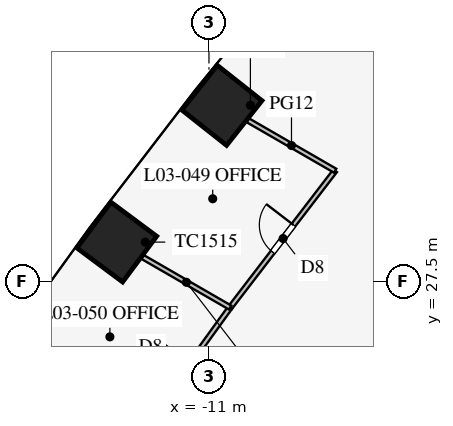
"""IFC4 building model, lengths in metres.
Left out: names, types, materials, properties, quantities, classifications, styles, units other than length and angle.
Written with IfcOpenShell. Run it as: python <this file> out.ifc"""

import sys

from ifc_helpers import new_model, si_unit, direction, frame, frame_2d, origin, origin_2d, place, context, subcontext, project, spatial, rectangle, extrude, element, fill, save


model = new_model("IFC4")
c1 = context("Model", 3, precision=1e-05, world=origin(), true_north=direction((0.0, 1.0)))
c2 = subcontext(c1, "Body", "Model", "MODEL_VIEW")
j1 = project(units=[si_unit("LENGTHUNIT", "METRE"), si_unit("PLANEANGLEUNIT", "RADIAN")], contexts=[c1])
p1 = place(None, origin())
s1 = spatial("IfcSite", under=j1, at=p1, CompositionType="ELEMENT")
p2 = place(p1, origin())
s2 = spatial("IfcBuilding", under=s1, at=p2, CompositionType="ELEMENT")
p3 = place(p2, frame((0.0, 0.0, 16.5)))
s3 = spatial("IfcBuildingStorey", under=s2, at=p3, CompositionType="ELEMENT", Elevation=16.5)
for number, where, z_axis, x_axis in (
    (1, (-10.66, 32.135, 0.0), (0.0, 0.0, 1.0), (-0.62, -0.784, 0.0)),
    (2, (-13.426, 28.536, 0.0), (0.0, 0.0, 1.0), (-0.597, -0.802, 0.0)),
    (3, (-16.076, 24.87, 0.0), (0.0, 0.0, 1.0), (-0.574, -0.819, 0.0)),
):
    element("IfcColumn", number, at=place(p3, frame(where, z_axis=z_axis, x_axis=x_axis)), inside=s3, PredefinedType="COLUMN", context=c2, shape_type="SweptSolid", body=[
        extrude(rectangle(XDim=1.5, YDim=1.5, at=origin_2d()), origin(), (0.0, 0.0, 1.0), 4.2),
    ])
p4 = place(p3, frame((-10.443, 26.814, 0.0), z_axis=(0.0, 0.0, 1.0), x_axis=(-0.58534077607, -0.810787380187, 0.0)))
e4 = element("IfcWall", 4, at=p4, inside=s3, PredefinedType="PARTITIONING", context=c2, shape_type="SweptSolid", body=[
    extrude(rectangle(XDim=4.523, YDim=0.12, at=frame_2d((2.262, 0.0))), origin(), (0.0, 0.0, 1.0), 2.9),
])
p5 = place(p4, frame((1.8, 0.0, 0.15)))
e5 = element("IfcOpeningElement", 5, at=p5, cuts=e4, PredefinedType="OPENING", context=c2, shape_type="SweptSolid", body=[
    extrude(rectangle(XDim=0.9, YDim=2.1, at=frame_2d((0.45, 1.05))), frame((0.0, 0.07, 0.0), z_axis=(0.0, -1.0, 0.0), x_axis=(1.0, 0.0, 0.0)), (0.0, 0.0, 1.0), 0.14),
])
p6 = place(p3, frame((-7.679, 30.415, 0.0), z_axis=(0.0, 0.0, 1.0), x_axis=(-0.608818785139, -0.79330932609, 0.0)))
e6 = element("IfcWall", 6, at=p6, inside=s3, PredefinedType="PARTITIONING", context=c2, shape_type="SweptSolid", body=[
    extrude(rectangle(XDim=4.539, YDim=0.12, at=frame_2d((2.27, 0.0))), origin(), (0.0, 0.0, 1.0), 2.9),
])
p7 = place(p6, frame((1.8, 0.0, 0.15)))
e7 = element("IfcOpeningElement", 7, at=p7, cuts=e6, PredefinedType="OPENING", context=c2, shape_type="SweptSolid", body=[
    extrude(rectangle(XDim=0.9, YDim=2.1, at=frame_2d((0.45, 1.05))), frame((0.0, 0.07, 0.0), z_axis=(0.0, -1.0, 0.0), x_axis=(1.0, 0.0, 0.0)), (0.0, 0.0, 1.0), 0.14),
])
p8 = place(p3, frame((-10.443, 26.814, 0.0), z_axis=(0.0, 0.0, 1.0), x_axis=(-0.866031171652, 0.499990009627, 0.0)))
e8 = element("IfcWall", 8, at=p8, inside=s3, PredefinedType="PARTITIONING", context=c2, shape_type="SweptSolid", body=[
    extrude(rectangle(XDim=2.659, YDim=0.12, at=frame_2d((1.33, 0.0))), origin(), (0.0, 0.0, 1.0), 2.9),
])
p9 = place(p3, frame((-7.679, 30.415, 0.0), z_axis=(0.0, 0.0, 1.0), x_axis=(-0.866026229868, 0.499998569178, 0.0)))
e9 = element("IfcWall", 9, at=p9, inside=s3, PredefinedType="PARTITIONING", context=c2, shape_type="SweptSolid", body=[
    extrude(rectangle(XDim=2.653, YDim=0.12, at=frame_2d((1.327, 0.0))), origin(), (0.0, 0.0, 1.0), 2.9),
])
p10 = place(p7, frame((0.9, 0.0, 0.0), z_axis=(0.0, 0.0, 1.0), x_axis=(-1.0, 0.0, 0.0)))
e10 = element("IfcDoor", 10, at=p10, inside=s3, OperationType="SINGLE_SWING_RIGHT", PredefinedType="DOOR", context=c2, shape_type="SweptSolid", body=[
    extrude(rectangle(XDim=0.9, YDim=2.1, at=frame_2d((0.45, 1.05))), frame((0.0, 0.025, 0.0), z_axis=(0.0, -1.0, 0.0), x_axis=(1.0, 0.0, 0.0)), (0.0, 0.0, 1.0), 0.05),
])
fill(e7, e10)
save(model, sys.argv[1])
